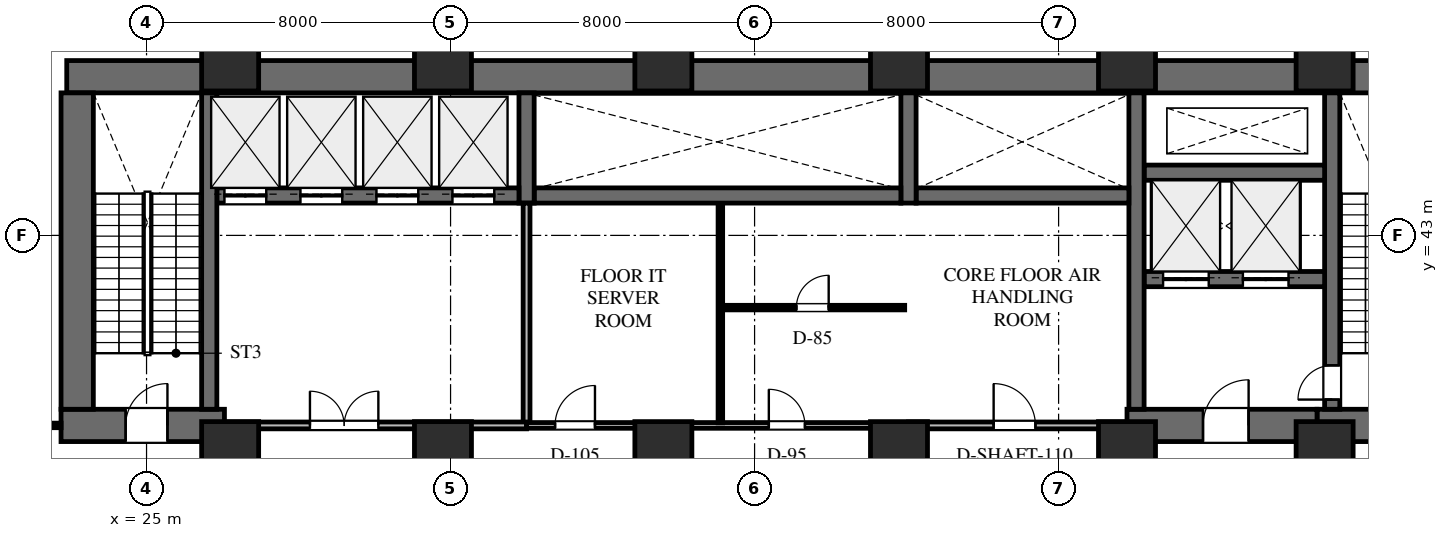
"""IFC4 building model, lengths in metres.
Left out: names, types, materials, properties, quantities, classifications, styles, units other than length and angle.
Written with IfcOpenShell. Run it as: python <this file> out.ifc"""

import sys

from ifc_helpers import new_model, si_unit, direction, frame, frame_2d, origin, origin_2d, place, context, subcontext, project, spatial, rectangle, extrude, element, fill, save


model = new_model("IFC4")
c1 = context("Model", 3, precision=1e-05, world=origin(), true_north=direction((0.0, 1.0)))
c2 = subcontext(c1, "Body", "Model", "MODEL_VIEW")
j1 = project(units=[si_unit("LENGTHUNIT", "METRE"), si_unit("PLANEANGLEUNIT", "RADIAN")], contexts=[c1])
p1 = place(None, origin())
s1 = spatial("IfcSite", under=j1, at=p1, CompositionType="ELEMENT")
p2 = place(p1, origin())
s2 = spatial("IfcBuilding", under=s1, at=p2, CompositionType="ELEMENT")
p3 = place(p2, frame((0.0, 0.0, 5.4)))
s3 = spatial("IfcBuildingStorey", under=s2, at=p3, CompositionType="ELEMENT", Elevation=5.4)
p4 = place(p3, frame((22.9, 47.175, 0.0), z_axis=(0.0, 0.0, 1.0), x_axis=(1.0, 0.0, 0.0)))
e1 = element("IfcWall", 1, at=p4, inside=s3, PredefinedType="SHEAR", context=c2, shape_type="SweptSolid", body=[
    extrude(rectangle(XDim=43.8, YDim=0.85, at=frame_2d((21.9, 0.0))), origin(), (0.0, 0.0, 1.0), 5.4),
])
p5 = place(p3, frame((55.8, 38.0, 0.0), z_axis=(0.0, 0.0, 1.0), x_axis=(1.0, 0.0, 0.0)))
e2 = element("IfcWall", 2, at=p5, inside=s3, PredefinedType="SHEAR", context=c2, shape_type="SweptSolid", body=[
    extrude(rectangle(XDim=10.9, YDim=0.85, at=frame_2d((5.45, 0.0))), origin(), (0.0, 0.0, 1.0), 5.4),
])
p6 = place(p5, frame((1.5, 0.0, 0.0)))
e3 = element("IfcOpeningElement", 3, at=p6, cuts=e2, PredefinedType="OPENING", context=c2, shape_type="SweptSolid", body=[
    extrude(rectangle(XDim=1.1, YDim=2.2, at=frame_2d((0.55, 1.1))), frame((0.0, 0.435, 0.0), z_axis=(0.0, -1.0, 0.0), x_axis=(1.0, 0.0, 0.0)), (0.0, 0.0, 1.0), 0.87),
])
p7 = place(p5, frame((4.82, 0.0, 0.0)))
e4 = element("IfcOpeningElement", 4, at=p7, cuts=e2, PredefinedType="OPENING", context=c2, shape_type="SweptSolid", body=[
    extrude(rectangle(XDim=1.0, YDim=2.15, at=frame_2d((0.5, 1.075))), frame((0.0, 0.435, 0.0), z_axis=(0.0, -1.0, 0.0), x_axis=(1.0, 0.0, 0.0)), (0.0, 0.0, 1.0), 0.87),
])
p8 = place(p5, frame((8.05, 0.0, 0.0)))
e5 = element("IfcOpeningElement", 5, at=p8, cuts=e2, PredefinedType="OPENING", context=c2, shape_type="SweptSolid", body=[
    extrude(rectangle(XDim=1.1, YDim=2.2, at=frame_2d((0.55, 1.1))), frame((0.0, 0.435, 0.0), z_axis=(0.0, -1.0, 0.0), x_axis=(1.0, 0.0, 0.0)), (0.0, 0.0, 1.0), 0.87),
])
p9 = place(p3, frame((56.2, 38.425, 0.0), z_axis=(0.0, 0.0, 1.0), x_axis=(0.0, 1.0, 0.0)))
e6 = element("IfcWall", 6, at=p9, inside=s3, PredefinedType="SHEAR", context=c2, shape_type="SweptSolid", body=[
    extrude(rectangle(XDim=8.325, YDim=0.4, at=frame_2d((4.163, 0.0))), origin(), (0.0, 0.0, 1.0), 5.4),
])
p10 = place(p9, frame((0.255, 0.0, 0.0)))
e7 = element("IfcOpeningElement", 7, at=p10, cuts=e6, PredefinedType="OPENING", context=c2, shape_type="SweptSolid", body=[
    extrude(rectangle(XDim=0.9, YDim=2.15, at=frame_2d((0.45, 1.075))), frame((0.0, 0.21, 0.0), z_axis=(0.0, -1.0, 0.0), x_axis=(1.0, 0.0, 0.0)), (0.0, 0.0, 1.0), 0.42),
])
p11 = place(p3, frame((50.8, 38.0, 0.0), z_axis=(0.0, 0.0, 1.0), x_axis=(1.0, 0.0, 0.0)))
e8 = element("IfcWall", 8, at=p11, inside=s3, PredefinedType="SHEAR", context=c2, shape_type="SweptSolid", body=[
    extrude(rectangle(XDim=5.0, YDim=0.85, at=frame_2d((2.5, 0.0))), origin(), (0.0, 0.0, 1.0), 5.4),
])
p12 = place(p11, frame((2.0, 0.0, 0.0)))
e9 = element("IfcOpeningElement", 9, at=p12, cuts=e8, PredefinedType="OPENING", context=c2, shape_type="SweptSolid", body=[
    extrude(rectangle(XDim=1.2, YDim=2.2, at=frame_2d((0.6, 1.1))), frame((0.0, 0.435, 0.0), z_axis=(0.0, -1.0, 0.0), x_axis=(1.0, 0.0, 0.0)), (0.0, 0.0, 1.0), 0.87),
])
p13 = place(p3, frame((51.25, 41.85, 0.0), z_axis=(0.0, 0.0, 1.0), x_axis=(1.0, 0.0, 0.0)))
e10 = element("IfcWall", 10, at=p13, inside=s3, PredefinedType="SHEAR", context=c2, shape_type="SweptSolid", body=[
    extrude(rectangle(XDim=4.75, YDim=0.4, at=frame_2d((2.375, 0.0))), origin(), (0.0, 0.0, 1.0), 5.4),
])
p14 = place(p13, frame((0.5, 0.0, 0.0)))
e11 = element("IfcOpeningElement", 11, at=p14, cuts=e10, PredefinedType="OPENING", context=c2, shape_type="SweptSolid", body=[
    extrude(rectangle(XDim=1.2, YDim=2.2, at=frame_2d((0.6, 1.1))), frame((0.0, 0.21, 0.0), z_axis=(0.0, -1.0, 0.0), x_axis=(1.0, 0.0, 0.0)), (0.0, 0.0, 1.0), 0.42),
])
p15 = place(p13, frame((2.6, 0.0, 0.0)))
e12 = element("IfcOpeningElement", 12, at=p15, cuts=e10, PredefinedType="OPENING", context=c2, shape_type="SweptSolid", body=[
    extrude(rectangle(XDim=1.2, YDim=2.2, at=frame_2d((0.6, 1.1))), frame((0.0, 0.21, 0.0), z_axis=(0.0, -1.0, 0.0), x_axis=(1.0, 0.0, 0.0)), (0.0, 0.0, 1.0), 0.42),
])
p16 = place(p3, frame((51.25, 44.65, 0.0), z_axis=(0.0, 0.0, 1.0), x_axis=(1.0, 0.0, 0.0)))
e13 = element("IfcWall", 13, at=p16, inside=s3, PredefinedType="SHEAR", context=c2, shape_type="SweptSolid", body=[
    extrude(rectangle(XDim=4.75, YDim=0.4, at=frame_2d((2.375, 0.0))), origin(), (0.0, 0.0, 1.0), 5.4),
])
p17 = place(p3, frame((51.05, 38.425, 0.0), z_axis=(0.0, 0.0, 1.0), x_axis=(0.0, 1.0, 0.0)))
e14 = element("IfcWall", 14, at=p17, inside=s3, PredefinedType="SHEAR", context=c2, shape_type="SweptSolid", body=[
    extrude(rectangle(XDim=8.325, YDim=0.4, at=frame_2d((4.163, 0.0))), origin(), (0.0, 0.0, 1.0), 5.4),
])
p18 = place(p3, frame((45.25, 44.05, 0.0), z_axis=(0.0, 0.0, 1.0), x_axis=(1.0, 0.0, 0.0)))
e15 = element("IfcWall", 15, at=p18, inside=s3, PredefinedType="SHEAR", context=c2, shape_type="SweptSolid", body=[
    extrude(rectangle(XDim=5.6, YDim=0.4, at=frame_2d((2.8, 0.0))), origin(), (0.0, 0.0, 1.0), 5.4),
])
p19 = place(p3, frame((45.05, 43.85, 0.0), z_axis=(0.0, 0.0, 1.0), x_axis=(0.0, 1.0, 0.0)))
e16 = element("IfcWall", 16, at=p19, inside=s3, PredefinedType="SHEAR", context=c2, shape_type="SweptSolid", body=[
    extrude(rectangle(XDim=2.9, YDim=0.4, at=frame_2d((1.45, 0.0))), origin(), (0.0, 0.0, 1.0), 5.4),
])
p20 = place(p3, frame((35.2, 44.05, 0.0), z_axis=(0.0, 0.0, 1.0), x_axis=(1.0, 0.0, 0.0)))
e17 = element("IfcWall", 17, at=p20, inside=s3, PredefinedType="SHEAR", context=c2, shape_type="SweptSolid", body=[
    extrude(rectangle(XDim=9.65, YDim=0.4, at=frame_2d((4.825, 0.0))), origin(), (0.0, 0.0, 1.0), 5.4),
])
p21 = place(p3, frame((35.0, 43.85, 0.0), z_axis=(0.0, 0.0, 1.0), x_axis=(0.0, 1.0, 0.0)))
e18 = element("IfcWall", 18, at=p21, inside=s3, PredefinedType="SHEAR", context=c2, shape_type="SweptSolid", body=[
    extrude(rectangle(XDim=2.9, YDim=0.4, at=frame_2d((1.45, 0.0))), origin(), (0.0, 0.0, 1.0), 5.4),
])
p22 = place(p3, frame((26.85, 44.05, 0.0), z_axis=(0.0, 0.0, 1.0), x_axis=(1.0, 0.0, 0.0)))
e19 = element("IfcWall", 19, at=p22, inside=s3, PredefinedType="SHEAR", context=c2, shape_type="SweptSolid", body=[
    extrude(rectangle(XDim=7.95, YDim=0.4, at=frame_2d((3.975, 0.0))), origin(), (0.0, 0.0, 1.0), 5.4),
])
p23 = place(p22, frame((0.2, 0.0, 0.0)))
e20 = element("IfcOpeningElement", 20, at=p23, cuts=e19, PredefinedType="OPENING", context=c2, shape_type="SweptSolid", body=[
    extrude(rectangle(XDim=1.1, YDim=2.2, at=frame_2d((0.55, 1.1))), frame((0.0, 0.21, 0.0), z_axis=(0.0, -1.0, 0.0), x_axis=(1.0, 0.0, 0.0)), (0.0, 0.0, 1.0), 0.42),
])
p24 = place(p22, frame((2.2, 0.0, 0.0)))
e21 = element("IfcOpeningElement", 21, at=p24, cuts=e19, PredefinedType="OPENING", context=c2, shape_type="SweptSolid", body=[
    extrude(rectangle(XDim=1.1, YDim=2.2, at=frame_2d((0.55, 1.1))), frame((0.0, 0.21, 0.0), z_axis=(0.0, -1.0, 0.0), x_axis=(1.0, 0.0, 0.0)), (0.0, 0.0, 1.0), 0.42),
])
p25 = place(p22, frame((4.2, 0.0, 0.0)))
e22 = element("IfcOpeningElement", 22, at=p25, cuts=e19, PredefinedType="OPENING", context=c2, shape_type="SweptSolid", body=[
    extrude(rectangle(XDim=1.1, YDim=2.2, at=frame_2d((0.55, 1.1))), frame((0.0, 0.21, 0.0), z_axis=(0.0, -1.0, 0.0), x_axis=(1.0, 0.0, 0.0)), (0.0, 0.0, 1.0), 0.42),
])
p26 = place(p22, frame((6.2, 0.0, 0.0)))
e23 = element("IfcOpeningElement", 23, at=p26, cuts=e19, PredefinedType="OPENING", context=c2, shape_type="SweptSolid", body=[
    extrude(rectangle(XDim=1.1, YDim=2.2, at=frame_2d((0.55, 1.1))), frame((0.0, 0.21, 0.0), z_axis=(0.0, -1.0, 0.0), x_axis=(1.0, 0.0, 0.0)), (0.0, 0.0, 1.0), 0.42),
])
p27 = place(p3, frame((22.75, 38.0, 0.0), z_axis=(0.0, 0.0, 1.0), x_axis=(1.0, 0.0, 0.0)))
e24 = element("IfcWall", 24, at=p27, inside=s3, PredefinedType="SHEAR", context=c2, shape_type="SweptSolid", body=[
    extrude(rectangle(XDim=4.3, YDim=0.85, at=frame_2d((2.15, 0.0))), origin(), (0.0, 0.0, 1.0), 5.4),
])
p28 = place(p27, frame((1.7, 0.0, 0.0)))
e25 = element("IfcOpeningElement", 25, at=p28, cuts=e24, PredefinedType="OPENING", context=c2, shape_type="SweptSolid", body=[
    extrude(rectangle(XDim=1.1, YDim=2.2, at=frame_2d((0.55, 1.1))), frame((0.0, 0.435, 0.0), z_axis=(0.0, -1.0, 0.0), x_axis=(1.0, 0.0, 0.0)), (0.0, 0.0, 1.0), 0.87),
])
p29 = place(p3, frame((23.175, 38.425, 0.0), z_axis=(0.0, 0.0, 1.0), x_axis=(0.0, 1.0, 0.0)))
e26 = element("IfcWall", 26, at=p29, inside=s3, PredefinedType="SHEAR", context=c2, shape_type="SweptSolid", body=[
    extrude(rectangle(XDim=8.325, YDim=0.85, at=frame_2d((4.163, 0.0))), origin(), (0.0, 0.0, 1.0), 5.4),
])
p30 = place(p3, frame((26.65, 38.425, 0.0), z_axis=(0.0, 0.0, 1.0), x_axis=(0.0, 1.0, 0.0)))
e27 = element("IfcWall", 27, at=p30, inside=s3, PredefinedType="SHEAR", context=c2, shape_type="SweptSolid", body=[
    extrude(rectangle(XDim=8.325, YDim=0.4, at=frame_2d((4.163, 0.0))), origin(), (0.0, 0.0, 1.0), 5.4),
])
for number, where, z_axis, x_axis in (
    (28, (56.0, 47.55, 0.0), (0.0, 0.0, 1.0), (1.0, 0.0, 0.0)),
    (29, (56.0, 37.35, 0.0), (0.0, 0.0, 1.0), (1.0, 0.0, 0.0)),
    (30, (50.8, 47.55, 0.0), (0.0, 0.0, 1.0), (1.0, 0.0, 0.0)),
    (31, (50.8, 37.35, 0.0), (0.0, 0.0, 1.0), (1.0, 0.0, 0.0)),
    (32, (44.8, 37.35, 0.0), (0.0, 0.0, 1.0), (1.0, 0.0, 0.0)),
    (33, (44.8, 47.55, 0.0), (0.0, 0.0, 1.0), (1.0, 0.0, 0.0)),
    (34, (38.6, 37.35, 0.0), (0.0, 0.0, 1.0), (1.0, 0.0, 0.0)),
    (35, (38.6, 47.55, 0.0), (0.0, 0.0, 1.0), (1.0, 0.0, 0.0)),
    (36, (32.8, 37.35, 0.0), (0.0, 0.0, 1.0), (1.0, 0.0, 0.0)),
    (37, (32.8, 47.55, 0.0), (0.0, 0.0, 1.0), (1.0, 0.0, 0.0)),
    (38, (27.2, 37.35, 0.0), (0.0, 0.0, 1.0), (1.0, 0.0, 0.0)),
    (39, (27.2, 47.55, 0.0), (0.0, 0.0, 1.0), (1.0, 0.0, 0.0)),
):
    element("IfcColumn", number, at=place(p3, frame(where, z_axis=z_axis, x_axis=x_axis)), inside=s3, PredefinedType="COLUMN", context=c2, shape_type="SweptSolid", body=[
        extrude(rectangle(XDim=1.5, YDim=1.5, at=origin_2d()), origin(), (0.0, 0.0, 1.0), 5.4),
    ])
p31 = place(p3, frame((45.05, 38.0, 0.0), z_axis=(0.0, 0.0, 1.0), x_axis=(1.0, 0.0, 0.0)))
e40 = element("IfcWall", 40, at=p31, inside=s3, PredefinedType="STANDARD", context=c2, shape_type="SweptSolid", body=[
    extrude(rectangle(XDim=5.75, YDim=0.18, at=frame_2d((2.875, 0.0))), origin(), (0.0, 0.0, 1.0), 4.182),
])
p32 = place(p31, frame((2.24, 0.0, 0.0)))
e41 = element("IfcOpeningElement", 41, at=p32, cuts=e40, PredefinedType="OPENING", context=c2, shape_type="SweptSolid", body=[
    extrude(rectangle(XDim=1.1, YDim=2.2, at=frame_2d((0.55, 1.1))), frame((0.0, 0.1, 0.0), z_axis=(0.0, -1.0, 0.0), x_axis=(1.0, 0.0, 0.0)), (0.0, 0.0, 1.0), 0.2),
])
p33 = place(p3, frame((35.0, 38.0, 0.0), z_axis=(0.0, 0.0, 1.0), x_axis=(0.0, 1.0, 0.0)))
e42 = element("IfcWall", 42, at=p33, inside=s3, PredefinedType="STANDARD", context=c2, shape_type="SweptSolid", body=[
    extrude(rectangle(XDim=5.85, YDim=0.18, at=frame_2d((2.925, 0.0))), origin(), (0.0, 0.0, 1.0), 5.13),
])
p34 = place(p3, frame((27.05, 38.0, 0.0), z_axis=(0.0, 0.0, 1.0), x_axis=(1.0, 0.0, 0.0)))
e43 = element("IfcWall", 43, at=p34, inside=s3, PredefinedType="STANDARD", context=c2, shape_type="SweptSolid", body=[
    extrude(rectangle(XDim=7.95, YDim=0.18, at=frame_2d((3.975, 0.0))), origin(), (0.0, 0.0, 1.0), 4.182),
])
p35 = place(p34, frame((2.25, 0.0, 0.0)))
e44 = element("IfcOpeningElement", 44, at=p35, cuts=e43, PredefinedType="OPENING", context=c2, shape_type="SweptSolid", body=[
    extrude(rectangle(XDim=1.8, YDim=2.2, at=frame_2d((0.9, 1.1))), frame((0.0, 0.1, 0.0), z_axis=(0.0, -1.0, 0.0), x_axis=(1.0, 0.0, 0.0)), (0.0, 0.0, 1.0), 0.2),
])
p36 = place(p3, frame((35.0, 38.0, 0.0), z_axis=(0.0, 0.0, 1.0), x_axis=(1.0, 0.0, 0.0)))
e45 = element("IfcWall", 45, at=p36, inside=s3, PredefinedType="PARTITIONING", context=c2, shape_type="SweptSolid", body=[
    extrude(rectangle(XDim=10.05, YDim=0.15, at=frame_2d((5.025, 0.0))), origin(), (0.0, 0.0, 1.0), 4.182),
])
p37 = place(p36, frame((0.75, 0.0, 0.0)))
e46 = element("IfcOpeningElement", 46, at=p37, cuts=e45, PredefinedType="OPENING", context=c2, shape_type="SweptSolid", body=[
    extrude(rectangle(XDim=1.05, YDim=2.2, at=frame_2d((0.525, 1.1))), frame((0.0, 0.085, 0.0), z_axis=(0.0, -1.0, 0.0), x_axis=(1.0, 0.0, 0.0)), (0.0, 0.0, 1.0), 0.17),
])
p38 = place(p36, frame((6.375, 0.0, 0.0)))
e47 = element("IfcOpeningElement", 47, at=p38, cuts=e45, PredefinedType="OPENING", context=c2, shape_type="SweptSolid", body=[
    extrude(rectangle(XDim=0.95, YDim=2.15, at=frame_2d((0.475, 1.075))), frame((0.0, 0.085, 0.0), z_axis=(0.0, -1.0, 0.0), x_axis=(1.0, 0.0, 0.0)), (0.0, 0.0, 1.0), 0.17),
])
p39 = place(p3, frame((40.1, 38.068, 0.0), z_axis=(0.0, 0.0, 1.0), x_axis=(0.0, 1.0, 0.0)))
e48 = element("IfcWall", 48, at=p39, inside=s3, PredefinedType="PARTITIONING", context=c2, shape_type="SweptSolid", body=[
    extrude(rectangle(XDim=5.774, YDim=0.12, at=frame_2d((2.887, 0.0))), origin(), (0.0, 0.0, 1.0), 5.13),
])
p40 = place(p3, frame((40.168, 41.1, 0.0), z_axis=(0.0, 0.0, 1.0), x_axis=(1.0, 0.0, 0.0)))
e49 = element("IfcWall", 49, at=p40, inside=s3, PredefinedType="PARTITIONING", context=c2, shape_type="SweptSolid", body=[
    extrude(rectangle(XDim=4.782, YDim=0.12, at=frame_2d((2.391, 0.0))), origin(), (0.0, 0.0, 1.0), 4.182),
])
p41 = place(p40, frame((1.932, 0.0, 0.0)))
e50 = element("IfcOpeningElement", 50, at=p41, cuts=e49, PredefinedType="OPENING", context=c2, shape_type="SweptSolid", body=[
    extrude(rectangle(XDim=0.85, YDim=2.1, at=frame_2d((0.425, 1.05))), frame((0.0, 0.07, 0.0), z_axis=(0.0, -1.0, 0.0), x_axis=(1.0, 0.0, 0.0)), (0.0, 0.0, 1.0), 0.14),
])
p42 = place(p3, frame((8.2, 38.0, 0.0), z_axis=(0.0, 0.0, 1.0), x_axis=(1.0, 0.0, 0.0)))
e51 = element("IfcWall", 51, at=p42, inside=s3, PredefinedType="PARTITIONING", context=c2, shape_type="SweptSolid", body=[
    extrude(rectangle(XDim=14.55, YDim=0.12, at=frame_2d((7.275, 0.0))), origin(), (0.0, 0.0, 1.0), 4.182),
])
p43 = place(p42, frame((1.482, 0.0, 0.0)))
e52 = element("IfcOpeningElement", 52, at=p43, cuts=e51, PredefinedType="OPENING", context=c2, shape_type="SweptSolid", body=[
    extrude(rectangle(XDim=0.95, YDim=2.15, at=frame_2d((0.475, 1.075))), frame((0.0, 0.07, 0.0), z_axis=(0.0, -1.0, 0.0), x_axis=(1.0, 0.0, 0.0)), (0.0, 0.0, 1.0), 0.14),
])
p44 = place(p42, frame((5.37, 0.0, 0.0)))
e53 = element("IfcOpeningElement", 53, at=p44, cuts=e51, PredefinedType="OPENING", context=c2, shape_type="SweptSolid", body=[
    extrude(rectangle(XDim=0.95, YDim=2.15, at=frame_2d((0.475, 1.075))), frame((0.0, 0.07, 0.0), z_axis=(0.0, -1.0, 0.0), x_axis=(1.0, 0.0, 0.0)), (0.0, 0.0, 1.0), 0.14),
])
p45 = place(p42, frame((11.437, 0.0, 0.0)))
e54 = element("IfcOpeningElement", 54, at=p45, cuts=e51, PredefinedType="OPENING", context=c2, shape_type="SweptSolid", body=[
    extrude(rectangle(XDim=0.95, YDim=2.15, at=frame_2d((0.475, 1.075))), frame((0.0, 0.07, 0.0), z_axis=(0.0, -1.0, 0.0), x_axis=(1.0, 0.0, 0.0)), (0.0, 0.0, 1.0), 0.14),
])
p46 = place(p12, origin())
e55 = element("IfcDoor", 55, at=p46, inside=s3, OperationType="SINGLE_SWING_RIGHT", PredefinedType="DOOR", context=c2, shape_type="SweptSolid", body=[
    extrude(rectangle(XDim=1.2, YDim=2.2, at=frame_2d((0.6, 1.1))), frame((0.0, 0.025, 0.0), z_axis=(0.0, -1.0, 0.0), x_axis=(1.0, 0.0, 0.0)), (0.0, 0.0, 1.0), 0.05),
])
fill(e9, e55)
p47 = place(p10, origin())
e56 = element("IfcDoor", 56, at=p47, inside=s3, OperationType="SINGLE_SWING_LEFT", PredefinedType="DOOR", context=c2, shape_type="SweptSolid", body=[
    extrude(rectangle(XDim=0.9, YDim=2.15, at=frame_2d((0.45, 1.075))), frame((0.0, 0.025, 0.0), z_axis=(0.0, -1.0, 0.0), x_axis=(1.0, 0.0, 0.0)), (0.0, 0.0, 1.0), 0.05),
])
fill(e7, e56)
p48 = place(p28, origin())
e57 = element("IfcDoor", 57, at=p48, inside=s3, OperationType="SINGLE_SWING_RIGHT", PredefinedType="DOOR", context=c2, shape_type="SweptSolid", body=[
    extrude(rectangle(XDim=1.1, YDim=2.2, at=frame_2d((0.55, 1.1))), frame((0.0, 0.025, 0.0), z_axis=(0.0, -1.0, 0.0), x_axis=(1.0, 0.0, 0.0)), (0.0, 0.0, 1.0), 0.05),
])
fill(e25, e57)
p49 = place(p23, origin())
e58 = element("IfcDoor", 58, at=p49, inside=s3, OperationType="DOUBLE_DOOR_SLIDING", PredefinedType="DOOR", context=c2, shape_type="SweptSolid", body=[
    extrude(rectangle(XDim=1.1, YDim=2.2, at=frame_2d((0.55, 1.1))), frame((0.0, 0.025, 0.0), z_axis=(0.0, -1.0, 0.0), x_axis=(1.0, 0.0, 0.0)), (0.0, 0.0, 1.0), 0.05),
])
fill(e20, e58)
p50 = place(p24, origin())
e59 = element("IfcDoor", 59, at=p50, inside=s3, OperationType="DOUBLE_DOOR_SLIDING", PredefinedType="DOOR", context=c2, shape_type="SweptSolid", body=[
    extrude(rectangle(XDim=1.1, YDim=2.2, at=frame_2d((0.55, 1.1))), frame((0.0, 0.025, 0.0), z_axis=(0.0, -1.0, 0.0), x_axis=(1.0, 0.0, 0.0)), (0.0, 0.0, 1.0), 0.05),
])
fill(e21, e59)
p51 = place(p25, origin())
e60 = element("IfcDoor", 60, at=p51, inside=s3, OperationType="DOUBLE_DOOR_SLIDING", PredefinedType="DOOR", context=c2, shape_type="SweptSolid", body=[
    extrude(rectangle(XDim=1.1, YDim=2.2, at=frame_2d((0.55, 1.1))), frame((0.0, 0.025, 0.0), z_axis=(0.0, -1.0, 0.0), x_axis=(1.0, 0.0, 0.0)), (0.0, 0.0, 1.0), 0.05),
])
fill(e22, e60)
p52 = place(p26, origin())
e61 = element("IfcDoor", 61, at=p52, inside=s3, OperationType="DOUBLE_DOOR_SLIDING", PredefinedType="DOOR", context=c2, shape_type="SweptSolid", body=[
    extrude(rectangle(XDim=1.1, YDim=2.2, at=frame_2d((0.55, 1.1))), frame((0.0, 0.025, 0.0), z_axis=(0.0, -1.0, 0.0), x_axis=(1.0, 0.0, 0.0)), (0.0, 0.0, 1.0), 0.05),
])
fill(e23, e61)
p53 = place(p14, origin())
e62 = element("IfcDoor", 62, at=p53, inside=s3, OperationType="DOUBLE_DOOR_SLIDING", PredefinedType="DOOR", context=c2, shape_type="SweptSolid", body=[
    extrude(rectangle(XDim=1.2, YDim=2.2, at=frame_2d((0.6, 1.1))), frame((0.0, 0.025, 0.0), z_axis=(0.0, -1.0, 0.0), x_axis=(1.0, 0.0, 0.0)), (0.0, 0.0, 1.0), 0.05),
])
fill(e11, e62)
p54 = place(p15, origin())
e63 = element("IfcDoor", 63, at=p54, inside=s3, OperationType="DOUBLE_DOOR_SLIDING", PredefinedType="DOOR", context=c2, shape_type="SweptSolid", body=[
    extrude(rectangle(XDim=1.2, YDim=2.2, at=frame_2d((0.6, 1.1))), frame((0.0, 0.025, 0.0), z_axis=(0.0, -1.0, 0.0), x_axis=(1.0, 0.0, 0.0)), (0.0, 0.0, 1.0), 0.05),
])
fill(e12, e63)
p55 = place(p32, origin())
e64 = element("IfcDoor", 64, at=p55, inside=s3, OperationType="SINGLE_SWING_LEFT", PredefinedType="DOOR", context=c2, shape_type="SweptSolid", body=[
    extrude(rectangle(XDim=1.1, YDim=2.2, at=frame_2d((0.55, 1.1))), frame((0.0, 0.025, 0.0), z_axis=(0.0, -1.0, 0.0), x_axis=(1.0, 0.0, 0.0)), (0.0, 0.0, 1.0), 0.05),
])
fill(e41, e64)
p56 = place(p35, origin())
e65 = element("IfcDoor", 65, at=p56, inside=s3, OperationType="DOUBLE_DOOR_SINGLE_SWING", PredefinedType="DOOR", context=c2, shape_type="SweptSolid", body=[
    extrude(rectangle(XDim=1.8, YDim=2.2, at=frame_2d((0.9, 1.1))), frame((0.0, 0.025, 0.0), z_axis=(0.0, -1.0, 0.0), x_axis=(1.0, 0.0, 0.0)), (0.0, 0.0, 1.0), 0.05),
])
fill(e44, e65)
p57 = place(p37, origin())
e66 = element("IfcDoor", 66, at=p57, inside=s3, OperationType="SINGLE_SWING_RIGHT", PredefinedType="DOOR", context=c2, shape_type="SweptSolid", body=[
    extrude(rectangle(XDim=1.05, YDim=2.2, at=frame_2d((0.525, 1.1))), frame((0.0, 0.025, 0.0), z_axis=(0.0, -1.0, 0.0), x_axis=(1.0, 0.0, 0.0)), (0.0, 0.0, 1.0), 0.05),
])
fill(e46, e66)
p58 = place(p38, origin())
e67 = element("IfcDoor", 67, at=p58, inside=s3, OperationType="SINGLE_SWING_LEFT", PredefinedType="DOOR", context=c2, shape_type="SweptSolid", body=[
    extrude(rectangle(XDim=0.95, YDim=2.15, at=frame_2d((0.475, 1.075))), frame((0.0, 0.025, 0.0), z_axis=(0.0, -1.0, 0.0), x_axis=(1.0, 0.0, 0.0)), (0.0, 0.0, 1.0), 0.05),
])
fill(e47, e67)
p59 = place(p41, origin())
e68 = element("IfcDoor", 68, at=p59, inside=s3, OperationType="SINGLE_SWING_RIGHT", PredefinedType="DOOR", context=c2, shape_type="SweptSolid", body=[
    extrude(rectangle(XDim=0.85, YDim=2.1, at=frame_2d((0.425, 1.05))), frame((0.0, 0.025, 0.0), z_axis=(0.0, -1.0, 0.0), x_axis=(1.0, 0.0, 0.0)), (0.0, 0.0, 1.0), 0.05),
])
fill(e50, e68)
save(model, sys.argv[1])
